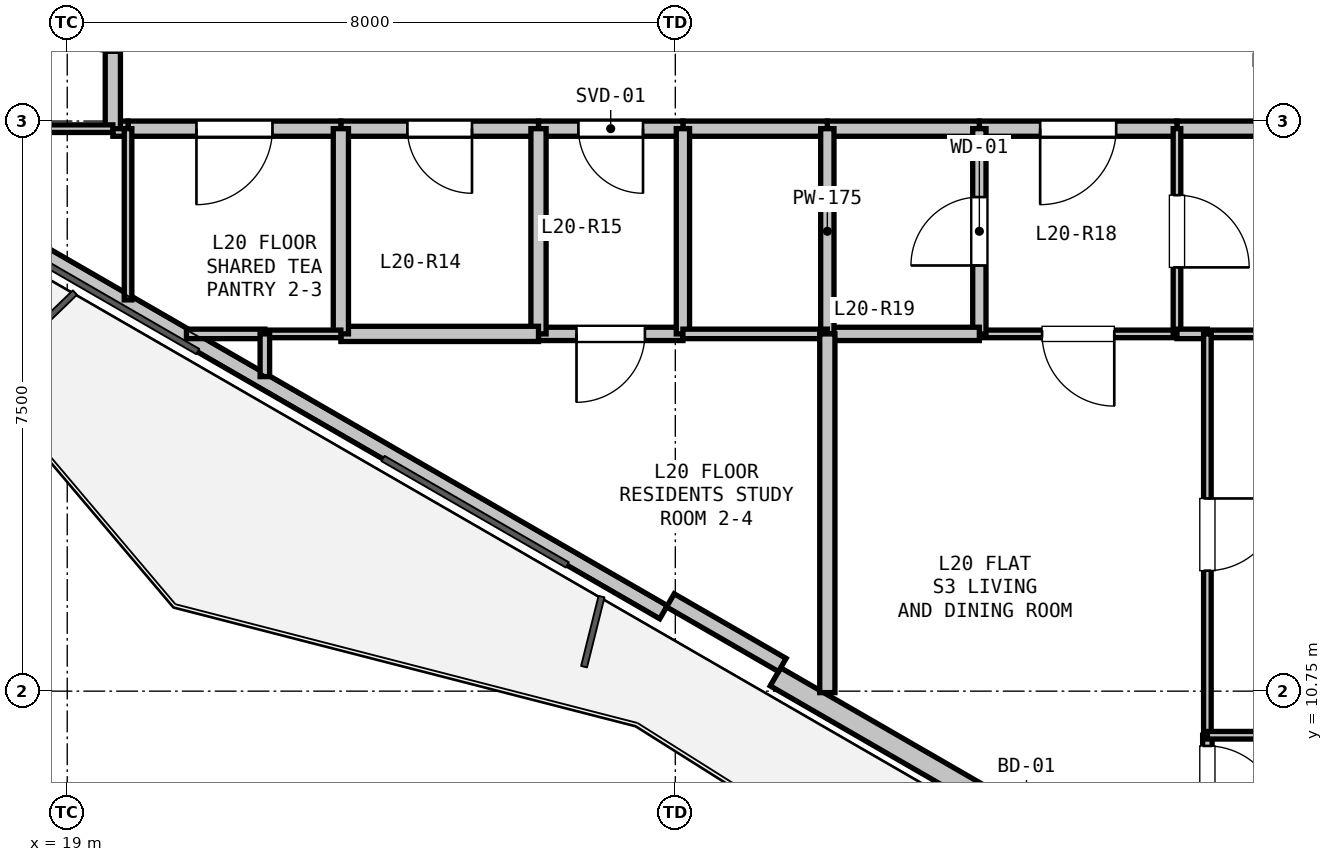
"""IFC4 building model, lengths in metres.
Left out: names, types, materials, properties, quantities, classifications, styles, units other than length and angle.
Written with IfcOpenShell. Run it as: python <this file> out.ifc"""

import sys

from ifc_helpers import new_model, si_unit, direction, frame, frame_2d, origin, place, context, subcontext, project, spatial, rectangle, extrude, element, fill, save


model = new_model("IFC4")
c1 = context("Model", 3, precision=1e-05, world=origin(), true_north=direction((0.0, 1.0)))
c2 = subcontext(c1, "Body", "Model", "MODEL_VIEW")
j1 = project(units=[si_unit("LENGTHUNIT", "METRE"), si_unit("PLANEANGLEUNIT", "RADIAN")], contexts=[c1])
p1 = place(None, origin())
s1 = spatial("IfcSite", under=j1, at=p1, CompositionType="ELEMENT")
p2 = place(p1, origin())
s2 = spatial("IfcBuilding", under=s1, at=p2, CompositionType="ELEMENT")
p3 = place(p2, frame((0.0, 0.0, 76.8)))
s3 = spatial("IfcBuildingStorey", under=s2, at=p3, CompositionType="ELEMENT", Elevation=76.8)
p4 = place(p3, frame((38.649, 4.973, 0.0), z_axis=(0.0, 0.0, 1.0), x_axis=(-0.866023023012, 0.500004123596, 0.0)))
e1 = element("IfcWall", 1, at=p4, inside=s3, PredefinedType="SOLIDWALL", context=c2, shape_type="SweptSolid", body=[
    extrude(rectangle(XDim=11.93, YDim=0.275, at=frame_2d((5.965, 0.0))), origin(), (0.0, 0.0, 1.0), 2.67),
])
p5 = place(p4, frame((7.616, 0.0, 0.0)))
e2 = element("IfcOpeningElement", 2, at=p5, cuts=e1, PredefinedType="OPENING", context=c2, shape_type="SweptSolid", body=[
    extrude(rectangle(XDim=1.0, YDim=2.1, at=frame_2d((0.5, 1.05))), frame((0.0, 0.147, 0.0), z_axis=(0.0, -1.0, 0.0), x_axis=(1.0, 0.0, 0.0)), (0.0, 0.0, 1.0), 0.295),
])
p6 = place(p4, frame((2.207, 0.0, 0.9)))
e3 = element("IfcOpeningElement", 3, at=p6, cuts=e1, PredefinedType="OPENING", context=c2, shape_type="SweptSolid", body=[
    extrude(rectangle(XDim=1.2, YDim=1.4, at=frame_2d((0.6, 0.7))), frame((0.0, 0.147, 0.0), z_axis=(0.0, -1.0, 0.0), x_axis=(1.0, 0.0, 0.0)), (0.0, 0.0, 1.0), 0.295),
])
p7 = place(p3, frame((26.845, 11.788, 0.0), z_axis=(0.0, 0.0, 1.0), x_axis=(-0.866027010039, 0.499997217876, 0.0)))
e4 = element("IfcWall", 4, at=p7, inside=s3, PredefinedType="PARAPET", context=c2, shape_type="SweptSolid", body=[
    extrude(rectangle(XDim=11.229, YDim=0.2, at=frame_2d((5.615, 0.0))), origin(), (0.0, 0.0, 1.0), 0.2),
])
p8 = place(p3, frame((28.407, 11.094, 0.0), z_axis=(0.0, 0.0, 1.0), x_axis=(-0.86605165483, 0.499954529098, 0.0)))
e5 = element("IfcWall", 5, at=p8, inside=s3, PredefinedType="PARAPET", context=c2, shape_type="SweptSolid", body=[
    extrude(rectangle(XDim=1.7, YDim=0.2, at=frame_2d((0.85, 0.0))), origin(), (0.0, 0.0, 1.0), 2.67),
])
p9 = place(p3, frame((35.8, 18.15, 0.0), z_axis=(0.0, 0.0, 1.0), x_axis=(-1.0, 0.0, 0.0)))
e6 = element("IfcWall", 6, at=p9, inside=s3, PredefinedType="PARTITIONING", context=c2, shape_type="SweptSolid", body=[
    extrude(rectangle(XDim=2.2, YDim=0.2, at=frame_2d((1.1, 0.0))), origin(), (0.0, 0.0, 1.0), 3.05),
])
p10 = place(p3, frame((33.6, 18.15, 0.0), z_axis=(0.0, 0.0, 1.0), x_axis=(-1.0, 0.0, 0.0)))
e7 = element("IfcWall", 7, at=p10, inside=s3, PredefinedType="PARTITIONING", context=c2, shape_type="SweptSolid", body=[
    extrude(rectangle(XDim=2.6, YDim=0.2, at=frame_2d((1.3, 0.0))), origin(), (0.0, 0.0, 1.0), 3.05),
])
p11 = place(p10, frame((0.8, 0.0, 0.0)))
e8 = element("IfcOpeningElement", 8, at=p11, cuts=e7, PredefinedType="OPENING", context=c2, shape_type="SweptSolid", body=[
    extrude(rectangle(XDim=1.0, YDim=2.15, at=frame_2d((0.5, 1.075))), frame((0.0, 0.11, 0.0), z_axis=(0.0, -1.0, 0.0), x_axis=(1.0, 0.0, 0.0)), (0.0, 0.0, 1.0), 0.22),
])
p12 = place(p3, frame((31.0, 18.15, 0.0), z_axis=(0.0, 0.0, 1.0), x_axis=(-1.0, 0.0, 0.0)))
e9 = element("IfcWall", 9, at=p12, inside=s3, PredefinedType="PARTITIONING", context=c2, shape_type="SweptSolid", body=[
    extrude(rectangle(XDim=2.0, YDim=0.2, at=frame_2d((1.0, 0.0))), origin(), (0.0, 0.0, 1.0), 3.05),
])
p13 = place(p3, frame((29.0, 18.15, 0.0), z_axis=(0.0, 0.0, 1.0), x_axis=(-1.0, 0.0, 0.0)))
e10 = element("IfcWall", 10, at=p13, inside=s3, PredefinedType="PARTITIONING", context=c2, shape_type="SweptSolid", body=[
    extrude(rectangle(XDim=1.9, YDim=0.2, at=frame_2d((0.95, 0.0))), origin(), (0.0, 0.0, 1.0), 3.05),
])
p14 = place(p3, frame((27.1, 18.15, 0.0), z_axis=(0.0, 0.0, 1.0), x_axis=(-1.0, 0.0, 0.0)))
e11 = element("IfcWall", 11, at=p14, inside=s3, PredefinedType="PARTITIONING", context=c2, shape_type="SweptSolid", body=[
    extrude(rectangle(XDim=1.9, YDim=0.2, at=frame_2d((0.95, 0.0))), origin(), (0.0, 0.0, 1.0), 3.05),
])
p15 = place(p14, frame((0.525, 0.0, 0.0)))
e12 = element("IfcOpeningElement", 12, at=p15, cuts=e11, PredefinedType="OPENING", context=c2, shape_type="SweptSolid", body=[
    extrude(rectangle(XDim=0.85, YDim=2.1, at=frame_2d((0.425, 1.05))), frame((0.0, 0.11, 0.0), z_axis=(0.0, -1.0, 0.0), x_axis=(1.0, 0.0, 0.0)), (0.0, 0.0, 1.0), 0.22),
])
p16 = place(p3, frame((25.2, 18.15, 0.0), z_axis=(0.0, 0.0, 1.0), x_axis=(-1.0, 0.0, 0.0)))
e13 = element("IfcWall", 13, at=p16, inside=s3, PredefinedType="PARTITIONING", context=c2, shape_type="SweptSolid", body=[
    extrude(rectangle(XDim=2.6, YDim=0.2, at=frame_2d((1.3, 0.0))), origin(), (0.0, 0.0, 1.0), 2.423),
])
p17 = place(p16, frame((0.875, 0.0, 0.0)))
e14 = element("IfcOpeningElement", 14, at=p17, cuts=e13, PredefinedType="OPENING", context=c2, shape_type="SweptSolid", body=[
    extrude(rectangle(XDim=0.85, YDim=2.1, at=frame_2d((0.425, 1.05))), frame((0.0, 0.11, 0.0), z_axis=(0.0, -1.0, 0.0), x_axis=(1.0, 0.0, 0.0)), (0.0, 0.0, 1.0), 0.22),
])
p18 = place(p3, frame((22.6, 18.15, 0.0), z_axis=(0.0, 0.0, 1.0), x_axis=(-1.0, 0.0, 0.0)))
e15 = element("IfcWall", 15, at=p18, inside=s3, PredefinedType="PARTITIONING", context=c2, shape_type="SweptSolid", body=[
    extrude(rectangle(XDim=2.8, YDim=0.2, at=frame_2d((1.4, 0.0))), origin(), (0.0, 0.0, 1.0), 3.05),
])
p19 = place(p18, frame((0.9, 0.0, 0.0)))
e16 = element("IfcOpeningElement", 16, at=p19, cuts=e15, PredefinedType="OPENING", context=c2, shape_type="SweptSolid", body=[
    extrude(rectangle(XDim=1.0, YDim=2.15, at=frame_2d((0.5, 1.075))), frame((0.0, 0.11, 0.0), z_axis=(0.0, -1.0, 0.0), x_axis=(1.0, 0.0, 0.0)), (0.0, 0.0, 1.0), 0.22),
])
p20 = place(p3, frame((19.8, 18.15, 0.0), z_axis=(0.0, 0.0, 1.0), x_axis=(-1.0, 0.0, 0.0)))
e17 = element("IfcWall", 17, at=p20, inside=s3, PredefinedType="PARTITIONING", context=c2, shape_type="SweptSolid", body=[
    extrude(rectangle(XDim=0.2, YDim=0.2, at=frame_2d((0.1, 0.0))), origin(), (0.0, 0.0, 1.0), 3.05),
])
p21 = place(p3, frame((19.6, 18.15, 0.0), z_axis=(0.0, 0.0, 1.0), x_axis=(0.0, 1.0, 0.0)))
e18 = element("IfcWall", 18, at=p21, inside=s3, PredefinedType="PARTITIONING", context=c2, shape_type="SweptSolid", body=[
    extrude(rectangle(XDim=3.0, YDim=0.2, at=frame_2d((1.5, 0.0))), origin(), (0.0, 0.0, 1.0), 2.423),
])
p22 = place(p21, frame((1.0, 0.0, 0.0)))
e19 = element("IfcOpeningElement", 19, at=p22, cuts=e18, PredefinedType="OPENING", context=c2, shape_type="SweptSolid", body=[
    extrude(rectangle(XDim=1.0, YDim=2.15, at=frame_2d((0.5, 1.075))), frame((0.0, 0.11, 0.0), z_axis=(0.0, -1.0, 0.0), x_axis=(1.0, 0.0, 0.0)), (0.0, 0.0, 1.0), 0.22),
])
p23 = place(p3, frame((33.6, 15.45, 0.0), z_axis=(0.0, 0.0, 1.0), x_axis=(-1.0, 0.0, 0.0)))
e20 = element("IfcWall", 20, at=p23, inside=s3, PredefinedType="PARTITIONING", context=c2, shape_type="SweptSolid", body=[
    extrude(rectangle(XDim=2.6, YDim=0.1, at=frame_2d((1.3, 0.0))), origin(), (0.0, 0.0, 1.0), 3.05),
])
p24 = place(p23, frame((0.825, 0.0, 0.0)))
e21 = element("IfcOpeningElement", 21, at=p24, cuts=e20, PredefinedType="OPENING", context=c2, shape_type="SweptSolid", body=[
    extrude(rectangle(XDim=0.95, YDim=2.1, at=frame_2d((0.475, 1.05))), frame((0.0, 0.06, 0.0), z_axis=(0.0, -1.0, 0.0), x_axis=(1.0, 0.0, 0.0)), (0.0, 0.0, 1.0), 0.12),
])
p25 = place(p3, frame((31.0, 15.45, 0.0), z_axis=(0.0, 0.0, 1.0), x_axis=(0.0, 1.0, 0.0)))
e22 = element("IfcWall", 22, at=p25, inside=s3, PredefinedType="PLUMBINGWALL", context=c2, shape_type="SweptSolid", body=[
    extrude(rectangle(XDim=2.7, YDim=0.175, at=frame_2d((1.35, 0.0))), origin(), (0.0, 0.0, 1.0), 3.05),
])
p26 = place(p25, frame((0.9, 0.0, 0.0)))
e23 = element("IfcOpeningElement", 23, at=p26, cuts=e22, PredefinedType="OPENING", context=c2, shape_type="SweptSolid", body=[
    extrude(rectangle(XDim=0.9, YDim=2.1, at=frame_2d((0.45, 1.05))), frame((0.0, 0.097, 0.0), z_axis=(0.0, -1.0, 0.0), x_axis=(1.0, 0.0, 0.0)), (0.0, 0.0, 1.0), 0.195),
])
p27 = place(p3, frame((33.6, 18.15, 0.0), z_axis=(0.0, 0.0, 1.0), x_axis=(0.0, -1.0, 0.0)))
e24 = element("IfcWall", 24, at=p27, inside=s3, PredefinedType="PARTITIONING", context=c2, shape_type="SweptSolid", body=[
    extrude(rectangle(XDim=2.7, YDim=0.1, at=frame_2d((1.35, 0.0))), origin(), (0.0, 0.0, 1.0), 3.05),
])
p28 = place(p27, frame((0.875, 0.0, 0.0)))
e25 = element("IfcOpeningElement", 25, at=p28, cuts=e24, PredefinedType="OPENING", context=c2, shape_type="SweptSolid", body=[
    extrude(rectangle(XDim=0.95, YDim=2.1, at=frame_2d((0.475, 1.05))), frame((0.0, 0.06, 0.0), z_axis=(0.0, -1.0, 0.0), x_axis=(1.0, 0.0, 0.0)), (0.0, 0.0, 1.0), 0.12),
])
p29 = place(p3, frame((27.1, 15.45, 0.0), z_axis=(0.0, 0.0, 1.0), x_axis=(-1.0, 0.0, 0.0)))
e26 = element("IfcWall", 26, at=p29, inside=s3, PredefinedType="PLUMBINGWALL", context=c2, shape_type="SweptSolid", body=[
    extrude(rectangle(XDim=1.9, YDim=0.175, at=frame_2d((0.95, 0.0))), origin(), (0.0, 0.0, 1.0), 2.423),
])
p30 = place(p29, frame((0.5, 0.0, 0.0)))
e27 = element("IfcOpeningElement", 27, at=p30, cuts=e26, PredefinedType="OPENING", context=c2, shape_type="SweptSolid", body=[
    extrude(rectangle(XDim=0.9, YDim=2.1, at=frame_2d((0.45, 1.05))), frame((0.0, 0.097, 0.0), z_axis=(0.0, -1.0, 0.0), x_axis=(1.0, 0.0, 0.0)), (0.0, 0.0, 1.0), 0.195),
])
p31 = place(p3, frame((25.2, 15.45, 0.0), z_axis=(0.0, 0.0, 1.0), x_axis=(0.0, 1.0, 0.0)))
e28 = element("IfcWall", 28, at=p31, inside=s3, PredefinedType="PARTITIONING", context=c2, shape_type="SweptSolid", body=[
    extrude(rectangle(XDim=2.7, YDim=0.2, at=frame_2d((1.35, 0.0))), origin(), (0.0, 0.0, 1.0), 2.423),
])
p32 = place(p3, frame((27.1, 18.15, 0.0), z_axis=(0.0, 0.0, 1.0), x_axis=(0.0, -1.0, 0.0)))
e29 = element("IfcWall", 29, at=p32, inside=s3, PredefinedType="PLUMBINGWALL", context=c2, shape_type="SweptSolid", body=[
    extrude(rectangle(XDim=2.7, YDim=0.175, at=frame_2d((1.35, 0.0))), origin(), (0.0, 0.0, 1.0), 3.05),
])
p33 = place(p3, frame((31.0, 15.45, 0.0), z_axis=(0.0, 0.0, 1.0), x_axis=(-1.0, 0.0, 0.0)))
e30 = element("IfcWall", 30, at=p33, inside=s3, PredefinedType="PLUMBINGWALL", context=c2, shape_type="SweptSolid", body=[
    extrude(rectangle(XDim=2.0, YDim=0.175, at=frame_2d((1.0, 0.0))), origin(), (0.0, 0.0, 1.0), 3.05),
])
p34 = place(p3, frame((29.0, 15.45, 0.0), z_axis=(0.0, 0.0, 1.0), x_axis=(0.0, 1.0, 0.0)))
e31 = element("IfcWall", 31, at=p34, inside=s3, PredefinedType="PLUMBINGWALL", context=c2, shape_type="SweptSolid", body=[
    extrude(rectangle(XDim=2.7, YDim=0.175, at=frame_2d((1.35, 0.0))), origin(), (0.0, 0.0, 1.0), 3.05),
])
p35 = place(p3, frame((42.873, 15.45, 0.0), z_axis=(0.0, 0.0, 1.0), x_axis=(-1.0, 0.0, 0.0)))
e32 = element("IfcWall", 32, at=p35, inside=s3, PredefinedType="PARTITIONING", context=c2, shape_type="SweptSolid", body=[
    extrude(rectangle(XDim=8.873, YDim=0.1, at=frame_2d((4.437, 0.0))), origin(), (0.0, 0.0, 1.0), 2.365),
])
p36 = place(p35, frame((3.962, 0.0, 0.0)))
e33 = element("IfcOpeningElement", 33, at=p36, cuts=e32, PredefinedType="OPENING", context=c2, shape_type="SweptSolid", body=[
    extrude(rectangle(XDim=0.95, YDim=2.1, at=frame_2d((0.475, 1.05))), frame((0.0, 0.06, 0.0), z_axis=(0.0, -1.0, 0.0), x_axis=(1.0, 0.0, 0.0)), (0.0, 0.0, 1.0), 0.12),
])
p37 = place(p3, frame((34.0, 15.45, 0.0), z_axis=(0.0, 0.0, 1.0), x_axis=(-1.0, 0.0, 0.0)))
e34 = element("IfcWall", 34, at=p37, inside=s3, PredefinedType="PARTITIONING", context=c2, shape_type="SweptSolid", body=[
    extrude(rectangle(XDim=0.4, YDim=0.125, at=frame_2d((0.2, 0.0))), origin(), (0.0, 0.0, 1.0), 3.05),
])
p38 = place(p3, frame((19.6, 18.15, 0.0), z_axis=(0.0, 0.0, 1.0), x_axis=(-1.0, 0.0, 0.0)))
e35 = element("IfcWall", 35, at=p38, inside=s3, PredefinedType="PARTITIONING", context=c2, shape_type="SweptSolid", body=[
    extrude(rectangle(XDim=2.45, YDim=0.1, at=frame_2d((1.225, 0.0))), origin(), (0.0, 0.0, 1.0), 2.365),
])
p39 = place(p3, frame((25.2, 15.45, 0.0), z_axis=(0.0, 0.0, 1.0), x_axis=(-1.0, 0.0, 0.0)))
e36 = element("IfcWall", 36, at=p39, inside=s3, PredefinedType="PARTITIONING", context=c2, shape_type="SweptSolid", body=[
    extrude(rectangle(XDim=2.6, YDim=0.2, at=frame_2d((1.3, 0.0))), origin(), (0.0, 0.0, 1.0), 3.05),
])
p40 = place(p3, frame((22.6, 15.45, 0.0), z_axis=(0.0, 0.0, 1.0), x_axis=(0.0, 1.0, 0.0)))
e37 = element("IfcWall", 37, at=p40, inside=s3, PredefinedType="PARTITIONING", context=c2, shape_type="SweptSolid", body=[
    extrude(rectangle(XDim=2.7, YDim=0.2, at=frame_2d((1.35, 0.0))), origin(), (0.0, 0.0, 1.0), 3.05),
])
p41 = place(p3, frame((22.6, 15.45, 0.0), z_axis=(0.0, 0.0, 1.0), x_axis=(-1.0, 0.0, 0.0)))
e38 = element("IfcWall", 38, at=p41, inside=s3, PredefinedType="PARTITIONING", context=c2, shape_type="SweptSolid", body=[
    extrude(rectangle(XDim=1.0, YDim=0.1, at=frame_2d((0.5, 0.0))), origin(), (0.0, 0.0, 1.0), 2.365),
])
p42 = place(p3, frame((21.6, 15.45, 0.0), z_axis=(0.0, 0.0, 1.0), x_axis=(-1.0, 0.0, 0.0)))
e39 = element("IfcWall", 39, at=p42, inside=s3, PredefinedType="PARTITIONING", context=c2, shape_type="SweptSolid", body=[
    extrude(rectangle(XDim=1.032, YDim=0.125, at=frame_2d((0.516, 0.0))), origin(), (0.0, 0.0, 1.0), 2.365),
])
p43 = place(p3, frame((19.8, 15.897, 0.0), z_axis=(0.0, 0.0, 1.0), x_axis=(0.0, 1.0, 0.0)))
e40 = element("IfcWall", 40, at=p43, inside=s3, PredefinedType="PARTITIONING", context=c2, shape_type="SweptSolid", body=[
    extrude(rectangle(XDim=2.252, YDim=0.1, at=frame_2d((1.126, 0.0))), origin(), (0.0, 0.0, 1.0), 2.365),
])
p44 = place(p3, frame((27.1, 15.45, 0.0), z_axis=(0.0, 0.0, 1.0), x_axis=(1.0, 0.0, 0.0)))
e41 = element("IfcWall", 41, at=p44, inside=s3, PredefinedType="PARTITIONING", context=c2, shape_type="SweptSolid", body=[
    extrude(rectangle(XDim=1.9, YDim=0.125, at=frame_2d((0.95, 0.0))), origin(), (0.0, 0.0, 1.0), 3.05),
])
p45 = place(p3, frame((29.0, 15.45, 0.0), z_axis=(0.0, 0.0, 1.0), x_axis=(0.0, -1.0, 0.0)))
e42 = element("IfcWall", 42, at=p45, inside=s3, PredefinedType="PARTITIONING", context=c2, shape_type="SweptSolid", body=[
    extrude(rectangle(XDim=4.719, YDim=0.2, at=frame_2d((2.36, 0.0))), origin(), (0.0, 0.0, 1.0), 2.365),
])
p46 = place(p3, frame((21.6, 14.888, 0.0), z_axis=(0.0, 0.0, 1.0), x_axis=(0.0, 1.0, 0.0)))
e43 = element("IfcWall", 43, at=p46, inside=s3, PredefinedType="PARTITIONING", context=c2, shape_type="SweptSolid", body=[
    extrude(rectangle(XDim=0.562, YDim=0.125, at=frame_2d((0.281, 0.0))), origin(), (0.0, 0.0, 1.0), 2.365),
])
p47 = place(p3, frame((34.0, 15.45, 0.0), z_axis=(0.0, 0.0, 1.0), x_axis=(0.0, -1.0, 0.0)))
e44 = element("IfcWall", 44, at=p47, inside=s3, PredefinedType="PARTITIONING", context=c2, shape_type="SweptSolid", body=[
    extrude(rectangle(XDim=5.28, YDim=0.1, at=frame_2d((2.64, 0.0))), origin(), (0.0, 0.0, 1.0), 3.05),
])
p48 = place(p47, frame((2.165, 0.0, 0.0)))
e45 = element("IfcOpeningElement", 45, at=p48, cuts=e44, PredefinedType="OPENING", context=c2, shape_type="SweptSolid", body=[
    extrude(rectangle(XDim=0.95, YDim=2.1, at=frame_2d((0.475, 1.05))), frame((0.0, 0.06, 0.0), z_axis=(0.0, -1.0, 0.0), x_axis=(1.0, 0.0, 0.0)), (0.0, 0.0, 1.0), 0.12),
])
p49 = place(p3, frame((34.0, 10.17, 0.0), z_axis=(0.0, 0.0, 1.0), x_axis=(0.0, -1.0, 0.0)))
e46 = element("IfcWall", 46, at=p49, inside=s3, PredefinedType="PARTITIONING", context=c2, shape_type="SweptSolid", body=[
    extrude(rectangle(XDim=2.326, YDim=0.125, at=frame_2d((1.163, 0.0))), origin(), (0.0, 0.0, 1.0), 3.05),
])
p50 = place(p49, frame((0.141, 0.0, 0.0)))
e47 = element("IfcOpeningElement", 47, at=p50, cuts=e46, PredefinedType="OPENING", context=c2, shape_type="SweptSolid", body=[
    extrude(rectangle(XDim=0.95, YDim=2.1, at=frame_2d((0.475, 1.05))), frame((0.0, 0.073, 0.0), z_axis=(0.0, -1.0, 0.0), x_axis=(1.0, 0.0, 0.0)), (0.0, 0.0, 1.0), 0.145),
])
p51 = place(p3, frame((34.0, 10.17, 0.0), z_axis=(0.0, 0.0, 1.0), x_axis=(1.0, 0.0, 0.0)))
e48 = element("IfcWall", 48, at=p51, inside=s3, PredefinedType="PARTITIONING", context=c2, shape_type="SweptSolid", body=[
    extrude(rectangle(XDim=8.873, YDim=0.1, at=frame_2d((4.437, 0.0))), origin(), (0.0, 0.0, 1.0), 2.423),
])
p52 = place(p51, frame((3.962, 0.0, 0.0)))
e49 = element("IfcOpeningElement", 49, at=p52, cuts=e48, PredefinedType="OPENING", context=c2, shape_type="SweptSolid", body=[
    extrude(rectangle(XDim=0.95, YDim=2.1, at=frame_2d((0.475, 1.05))), frame((0.0, 0.06, 0.0), z_axis=(0.0, -1.0, 0.0), x_axis=(1.0, 0.0, 0.0)), (0.0, 0.0, 1.0), 0.12),
])
p53 = place(p11, origin())
e50 = element("IfcDoor", 50, at=p53, inside=s3, OperationType="SINGLE_SWING_RIGHT", PredefinedType="DOOR", context=c2, shape_type="SweptSolid", body=[
    extrude(rectangle(XDim=1.0, YDim=2.15, at=frame_2d((0.5, 1.075))), frame((0.0, 0.025, 0.0), z_axis=(0.0, -1.0, 0.0), x_axis=(1.0, 0.0, 0.0)), (0.0, 0.0, 1.0), 0.05),
])
fill(e8, e50)
p54 = place(p15, origin())
e51 = element("IfcDoor", 51, at=p54, inside=s3, OperationType="SINGLE_SWING_LEFT", PredefinedType="DOOR", context=c2, shape_type="SweptSolid", body=[
    extrude(rectangle(XDim=0.85, YDim=2.1, at=frame_2d((0.425, 1.05))), frame((0.0, 0.025, 0.0), z_axis=(0.0, -1.0, 0.0), x_axis=(1.0, 0.0, 0.0)), (0.0, 0.0, 1.0), 0.05),
])
fill(e12, e51)
p55 = place(p17, origin())
e52 = element("IfcDoor", 52, at=p55, inside=s3, OperationType="SINGLE_SWING_LEFT", PredefinedType="DOOR", context=c2, shape_type="SweptSolid", body=[
    extrude(rectangle(XDim=0.85, YDim=2.1, at=frame_2d((0.425, 1.05))), frame((0.0, 0.025, 0.0), z_axis=(0.0, -1.0, 0.0), x_axis=(1.0, 0.0, 0.0)), (0.0, 0.0, 1.0), 0.05),
])
fill(e14, e52)
p56 = place(p19, origin())
e53 = element("IfcDoor", 53, at=p56, inside=s3, OperationType="SINGLE_SWING_RIGHT", PredefinedType="DOOR", context=c2, shape_type="SweptSolid", body=[
    extrude(rectangle(XDim=1.0, YDim=2.15, at=frame_2d((0.5, 1.075))), frame((0.0, 0.025, 0.0), z_axis=(0.0, -1.0, 0.0), x_axis=(1.0, 0.0, 0.0)), (0.0, 0.0, 1.0), 0.05),
])
fill(e16, e53)
p57 = place(p26, origin())
e54 = element("IfcDoor", 54, at=p57, inside=s3, OperationType="SINGLE_SWING_LEFT", PredefinedType="DOOR", context=c2, shape_type="SweptSolid", body=[
    extrude(rectangle(XDim=0.9, YDim=2.1, at=frame_2d((0.45, 1.05))), frame((0.0, 0.025, 0.0), z_axis=(0.0, -1.0, 0.0), x_axis=(1.0, 0.0, 0.0)), (0.0, 0.0, 1.0), 0.05),
])
fill(e23, e54)
p58 = place(p28, origin())
e55 = element("IfcDoor", 55, at=p58, inside=s3, OperationType="SINGLE_SWING_RIGHT", PredefinedType="DOOR", context=c2, shape_type="SweptSolid", body=[
    extrude(rectangle(XDim=0.95, YDim=2.1, at=frame_2d((0.475, 1.05))), frame((0.0, 0.025, 0.0), z_axis=(0.0, -1.0, 0.0), x_axis=(1.0, 0.0, 0.0)), (0.0, 0.0, 1.0), 0.05),
])
fill(e25, e55)
p59 = place(p24, origin())
e56 = element("IfcDoor", 56, at=p59, inside=s3, OperationType="SINGLE_SWING_LEFT", PredefinedType="DOOR", context=c2, shape_type="SweptSolid", body=[
    extrude(rectangle(XDim=0.95, YDim=2.1, at=frame_2d((0.475, 1.05))), frame((0.0, 0.025, 0.0), z_axis=(0.0, -1.0, 0.0), x_axis=(1.0, 0.0, 0.0)), (0.0, 0.0, 1.0), 0.05),
])
fill(e21, e56)
p60 = place(p50, origin())
e57 = element("IfcDoor", 57, at=p60, inside=s3, OperationType="SINGLE_SWING_RIGHT", PredefinedType="DOOR", context=c2, shape_type="SweptSolid", body=[
    extrude(rectangle(XDim=0.95, YDim=2.1, at=frame_2d((0.475, 1.05))), frame((0.0, 0.025, 0.0), z_axis=(0.0, -1.0, 0.0), x_axis=(1.0, 0.0, 0.0)), (0.0, 0.0, 1.0), 0.05),
])
fill(e47, e57)
p61 = place(p48, origin())
e58 = element("IfcDoor", 58, at=p61, inside=s3, OperationType="SINGLE_SWING_LEFT", PredefinedType="DOOR", context=c2, shape_type="SweptSolid", body=[
    extrude(rectangle(XDim=0.95, YDim=2.1, at=frame_2d((0.475, 1.05))), frame((0.0, 0.025, 0.0), z_axis=(0.0, -1.0, 0.0), x_axis=(1.0, 0.0, 0.0)), (0.0, 0.0, 1.0), 0.05),
])
fill(e45, e58)
p62 = place(p30, origin())
e59 = element("IfcDoor", 59, at=p62, inside=s3, OperationType="SINGLE_SWING_RIGHT", PredefinedType="DOOR", context=c2, shape_type="SweptSolid", body=[
    extrude(rectangle(XDim=0.9, YDim=2.1, at=frame_2d((0.45, 1.05))), frame((0.0, 0.025, 0.0), z_axis=(0.0, -1.0, 0.0), x_axis=(1.0, 0.0, 0.0)), (0.0, 0.0, 1.0), 0.05),
])
fill(e27, e59)
save(model, sys.argv[1])
